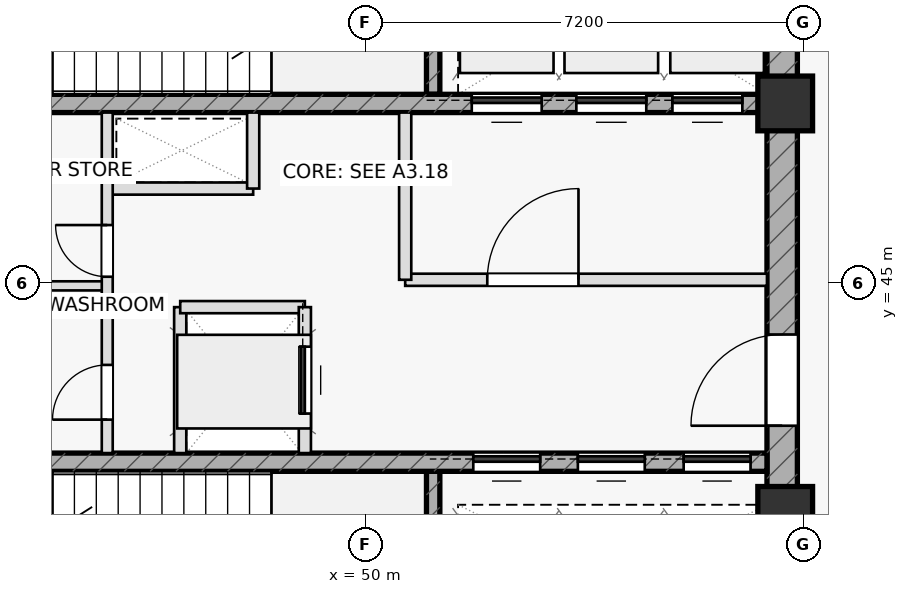
"""IFC4 building model, lengths in metres.
Left out: names, types, materials, properties, quantities, classifications, styles, units other than length and angle.
Written with IfcOpenShell. Run it as: python <this file> out.ifc"""

import sys

from ifc_helpers import new_model, si_unit, direction, frame, frame_2d, origin, origin_2d, place, context, subcontext, project, spatial, rectangle, extrude, element, fill, save


model = new_model("IFC4")
c1 = context("Model", 3, precision=1e-05, world=origin(), true_north=direction((0.0, 1.0)))
c2 = subcontext(c1, "Body", "Model", "MODEL_VIEW")
j1 = project(units=[si_unit("LENGTHUNIT", "METRE"), si_unit("PLANEANGLEUNIT", "RADIAN")], contexts=[c1])
p1 = place(None, origin())
s1 = spatial("IfcSite", under=j1, at=p1, CompositionType="ELEMENT")
p2 = place(p1, origin())
s2 = spatial("IfcBuilding", under=s1, at=p2, CompositionType="ELEMENT")
p3 = place(p2, frame((0.0, 0.0, 200.3)))
s3 = spatial("IfcBuildingStorey", under=s2, at=p3, CompositionType="ELEMENT", Elevation=200.3)
for number, where, z_axis, x_axis in (
    (1, (51.11, 48.1, 0.0), (0.0, 0.0, 1.0), (0.0, 1.0, 0.0)),
    (2, (51.11, 38.8, 0.0), (0.0, 0.0, 1.0), (0.0, 1.0, 0.0)),
):
    element("IfcWall", number, at=place(p3, frame(where, z_axis=z_axis, x_axis=x_axis)), inside=s3, PredefinedType="SHEAR", context=c2, shape_type="SweptSolid", body=[
        extrude(rectangle(XDim=3.1, YDim=0.22, at=frame_2d((1.55, 0.0))), origin(), (0.0, 0.0, 1.0), 3.55),
    ])
p4 = place(p3, frame((56.85, 38.8, 0.0), z_axis=(0.0, 0.0, 1.0), x_axis=(0.0, 1.0, 0.0)))
e3 = element("IfcWall", 3, at=p4, inside=s3, PredefinedType="SHEAR", context=c2, shape_type="SweptSolid", body=[
    extrude(rectangle(XDim=12.4, YDim=0.5, at=frame_2d((6.2, 0.0))), origin(), (0.0, 0.0, 1.0), 3.55),
])
p5 = place(p4, frame((3.85, 0.0, 0.0)))
e4 = element("IfcOpeningElement", 4, at=p5, cuts=e3, PredefinedType="OPENING", context=c2, shape_type="SweptSolid", body=[
    extrude(rectangle(XDim=1.5, YDim=2.2, at=frame_2d((0.75, 1.1))), frame((0.0, 0.26, 0.0), z_axis=(0.0, -1.0, 0.0), x_axis=(1.0, 0.0, 0.0)), (0.0, 0.0, 1.0), 0.52),
])
p6 = place(p3, frame((43.4, 47.95, 0.0), z_axis=(0.0, 0.0, 1.0), x_axis=(1.0, 0.0, 0.0)))
e5 = element("IfcWall", 5, at=p6, inside=s3, PredefinedType="SHEAR", context=c2, shape_type="SweptSolid", body=[
    extrude(rectangle(XDim=13.2, YDim=0.3, at=frame_2d((6.6, 0.0))), origin(), (0.0, 0.0, 1.0), 3.55),
])
p7 = place(p6, frame((8.345, 0.0, 0.0)))
e6 = element("IfcOpeningElement", 6, at=p7, cuts=e5, PredefinedType="OPENING", context=c2, shape_type="SweptSolid", body=[
    extrude(rectangle(XDim=1.15, YDim=2.2, at=frame_2d((0.575, 1.1))), frame((0.0, 0.16, 0.0), z_axis=(0.0, -1.0, 0.0), x_axis=(1.0, 0.0, 0.0)), (0.0, 0.0, 1.0), 0.32),
])
p8 = place(p6, frame((10.065, 0.0, 0.0)))
e7 = element("IfcOpeningElement", 7, at=p8, cuts=e5, PredefinedType="OPENING", context=c2, shape_type="SweptSolid", body=[
    extrude(rectangle(XDim=1.15, YDim=2.2, at=frame_2d((0.575, 1.1))), frame((0.0, 0.16, 0.0), z_axis=(0.0, -1.0, 0.0), x_axis=(1.0, 0.0, 0.0)), (0.0, 0.0, 1.0), 0.32),
])
p9 = place(p6, frame((11.645, 0.0, 0.0)))
e8 = element("IfcOpeningElement", 8, at=p9, cuts=e5, PredefinedType="OPENING", context=c2, shape_type="SweptSolid", body=[
    extrude(rectangle(XDim=1.15, YDim=2.2, at=frame_2d((0.575, 1.1))), frame((0.0, 0.16, 0.0), z_axis=(0.0, -1.0, 0.0), x_axis=(1.0, 0.0, 0.0)), (0.0, 0.0, 1.0), 0.32),
])
p10 = place(p3, frame((43.4, 42.05, 0.0), z_axis=(0.0, 0.0, 1.0), x_axis=(1.0, 0.0, 0.0)))
e9 = element("IfcWall", 9, at=p10, inside=s3, PredefinedType="SHEAR", context=c2, shape_type="SweptSolid", body=[
    extrude(rectangle(XDim=13.2, YDim=0.3, at=frame_2d((6.6, 0.0))), origin(), (0.0, 0.0, 1.0), 3.55),
])
p11 = place(p10, frame((8.37, 0.0, 0.0)))
e10 = element("IfcOpeningElement", 10, at=p11, cuts=e9, PredefinedType="OPENING", context=c2, shape_type="SweptSolid", body=[
    extrude(rectangle(XDim=1.1, YDim=2.15, at=frame_2d((0.55, 1.075))), frame((0.0, 0.16, 0.0), z_axis=(0.0, -1.0, 0.0), x_axis=(1.0, 0.0, 0.0)), (0.0, 0.0, 1.0), 0.32),
])
p12 = place(p10, frame((10.09, 0.0, 0.0)))
e11 = element("IfcOpeningElement", 11, at=p12, cuts=e9, PredefinedType="OPENING", context=c2, shape_type="SweptSolid", body=[
    extrude(rectangle(XDim=1.1, YDim=2.15, at=frame_2d((0.55, 1.075))), frame((0.0, 0.16, 0.0), z_axis=(0.0, -1.0, 0.0), x_axis=(1.0, 0.0, 0.0)), (0.0, 0.0, 1.0), 0.32),
])
p13 = place(p10, frame((11.83, 0.0, 0.0)))
e12 = element("IfcOpeningElement", 12, at=p13, cuts=e9, PredefinedType="OPENING", context=c2, shape_type="SweptSolid", body=[
    extrude(rectangle(XDim=1.1, YDim=2.15, at=frame_2d((0.55, 1.075))), frame((0.0, 0.16, 0.0), z_axis=(0.0, -1.0, 0.0), x_axis=(1.0, 0.0, 0.0)), (0.0, 0.0, 1.0), 0.32),
])
for number, where, z_axis, x_axis in (
    (13, (56.9, 47.95, 0.0), (0.0, 0.0, 1.0), (1.0, 0.0, 0.0)),
    (14, (56.9, 41.2, 0.0), (0.0, 0.0, 1.0), (1.0, 0.0, 0.0)),
):
    element("IfcColumn", number, at=place(p3, frame(where, z_axis=z_axis, x_axis=x_axis)), inside=s3, PredefinedType="COLUMN", context=c2, shape_type="SweptSolid", body=[
        extrude(rectangle(XDim=0.9, YDim=0.9, at=origin_2d()), origin(), (0.0, 0.0, 1.0), 3.55),
    ])
p14 = place(p3, frame((45.75, 46.55, 0.0), z_axis=(0.0, 0.0, 1.0), x_axis=(1.0, 0.0, 0.0)))
e15 = element("IfcWall", 15, at=p14, inside=s3, PredefinedType="PARTITIONING", context=c2, shape_type="SweptSolid", body=[
    extrude(rectangle(XDim=2.4, YDim=0.2, at=frame_2d((1.2, 0.0))), origin(), (0.0, 0.0, 1.0), 3.55),
])
p15 = place(p3, frame((48.15, 46.55, 0.0), z_axis=(0.0, 0.0, 1.0), x_axis=(0.0, 1.0, 0.0)))
e16 = element("IfcWall", 16, at=p15, inside=s3, PredefinedType="PARTITIONING", context=c2, shape_type="SweptSolid", body=[
    extrude(rectangle(XDim=1.25, YDim=0.2, at=frame_2d((0.625, 0.0))), origin(), (0.0, 0.0, 1.0), 3.55),
])
p16 = place(p3, frame((46.95, 42.2, 0.0), z_axis=(0.0, 0.0, 1.0), x_axis=(0.0, 1.0, 0.0)))
e17 = element("IfcWall", 17, at=p16, inside=s3, PredefinedType="PARTITIONING", context=c2, shape_type="SweptSolid", body=[
    extrude(rectangle(XDim=2.4, YDim=0.2, at=frame_2d((1.2, 0.0))), origin(), (0.0, 0.0, 1.0), 3.55),
])
p17 = place(p3, frame((46.95, 44.6, 0.0), z_axis=(0.0, 0.0, 1.0), x_axis=(1.0, 0.0, 0.0)))
e18 = element("IfcWall", 18, at=p17, inside=s3, PredefinedType="PARTITIONING", context=c2, shape_type="SweptSolid", body=[
    extrude(rectangle(XDim=2.05, YDim=0.2, at=frame_2d((1.025, 0.0))), origin(), (0.0, 0.0, 1.0), 3.55),
])
p18 = place(p3, frame((50.65, 45.05, 0.0), z_axis=(0.0, 0.0, 1.0), x_axis=(1.0, 0.0, 0.0)))
e19 = element("IfcWall", 19, at=p18, inside=s3, PredefinedType="PARTITIONING", context=c2, shape_type="SweptSolid", body=[
    extrude(rectangle(XDim=5.95, YDim=0.2, at=frame_2d((2.975, 0.0))), origin(), (0.0, 0.0, 1.0), 3.55),
])
p19 = place(p18, frame((1.35, 0.0, 0.0)))
e20 = element("IfcOpeningElement", 20, at=p19, cuts=e19, PredefinedType="OPENING", context=c2, shape_type="SweptSolid", body=[
    extrude(rectangle(XDim=1.5, YDim=2.2, at=frame_2d((0.75, 1.1))), frame((0.0, 0.11, 0.0), z_axis=(0.0, -1.0, 0.0), x_axis=(1.0, 0.0, 0.0)), (0.0, 0.0, 1.0), 0.22),
])
p20 = place(p3, frame((50.65, 45.05, 0.0), z_axis=(0.0, 0.0, 1.0), x_axis=(0.0, 1.0, 0.0)))
e21 = element("IfcWall", 21, at=p20, inside=s3, PredefinedType="PARTITIONING", context=c2, shape_type="SweptSolid", body=[
    extrude(rectangle(XDim=2.75, YDim=0.2, at=frame_2d((1.375, 0.0))), origin(), (0.0, 0.0, 1.0), 3.55),
])
p21 = place(p3, frame((43.4, 44.95, 0.0), z_axis=(0.0, 0.0, 1.0), x_axis=(1.0, 0.0, 0.0)))
e22 = element("IfcWall", 22, at=p21, inside=s3, PredefinedType="PARTITIONING", context=c2, shape_type="SweptSolid", body=[
    extrude(rectangle(XDim=2.35, YDim=0.15, at=frame_2d((1.175, 0.0))), origin(), (0.0, 0.0, 1.0), 3.55),
])
p22 = place(p3, frame((45.75, 42.2, 0.0), z_axis=(0.0, 0.0, 1.0), x_axis=(0.0, 1.0, 0.0)))
e23 = element("IfcWall", 23, at=p22, inside=s3, PredefinedType="PARTITIONING", context=c2, shape_type="SweptSolid", body=[
    extrude(rectangle(XDim=5.6, YDim=0.18, at=frame_2d((2.8, 0.0))), origin(), (0.0, 0.0, 1.0), 3.55),
])
p23 = place(p22, frame((0.55, 0.0, 0.0)))
e24 = element("IfcOpeningElement", 24, at=p23, cuts=e23, PredefinedType="OPENING", context=c2, shape_type="SweptSolid", body=[
    extrude(rectangle(XDim=0.9, YDim=2.05, at=frame_2d((0.45, 1.025))), frame((0.0, 0.1, 0.0), z_axis=(0.0, -1.0, 0.0), x_axis=(1.0, 0.0, 0.0)), (0.0, 0.0, 1.0), 0.2),
])
p24 = place(p22, frame((2.9, 0.0, 0.0)))
e25 = element("IfcOpeningElement", 25, at=p24, cuts=e23, PredefinedType="OPENING", context=c2, shape_type="SweptSolid", body=[
    extrude(rectangle(XDim=0.85, YDim=2.05, at=frame_2d((0.425, 1.025))), frame((0.0, 0.1, 0.0), z_axis=(0.0, -1.0, 0.0), x_axis=(1.0, 0.0, 0.0)), (0.0, 0.0, 1.0), 0.2),
])
p25 = place(p3, frame((49.0, 42.2, 0.0), z_axis=(0.0, 0.0, 1.0), x_axis=(0.0, 1.0, 0.0)))
e26 = element("IfcWall", 26, at=p25, inside=s3, PredefinedType="PARTITIONING", context=c2, shape_type="SweptSolid", body=[
    extrude(rectangle(XDim=2.4, YDim=0.2, at=frame_2d((1.2, 0.0))), origin(), (0.0, 0.0, 1.0), 3.55),
])
p26 = place(p25, frame((0.65, 0.0, 0.0)))
e27 = element("IfcOpeningElement", 27, at=p26, cuts=e26, PredefinedType="OPENING", context=c2, shape_type="SweptSolid", body=[
    extrude(rectangle(XDim=1.1, YDim=2.15, at=frame_2d((0.55, 1.075))), frame((0.0, 0.11, 0.0), z_axis=(0.0, -1.0, 0.0), x_axis=(1.0, 0.0, 0.0)), (0.0, 0.0, 1.0), 0.22),
])
p27 = place(p5, origin())
e28 = element("IfcDoor", 28, at=p27, inside=s3, OperationType="SINGLE_SWING_LEFT", PredefinedType="DOOR", context=c2, shape_type="SweptSolid", body=[
    extrude(rectangle(XDim=1.5, YDim=2.2, at=frame_2d((0.75, 1.1))), frame((0.0, 0.025, 0.0), z_axis=(0.0, -1.0, 0.0), x_axis=(1.0, 0.0, 0.0)), (0.0, 0.0, 1.0), 0.05),
])
fill(e4, e28)
p28 = place(p19, origin())
e29 = element("IfcDoor", 29, at=p28, inside=s3, OperationType="SINGLE_SWING_RIGHT", PredefinedType="DOOR", context=c2, shape_type="SweptSolid", body=[
    extrude(rectangle(XDim=1.5, YDim=2.2, at=frame_2d((0.75, 1.1))), frame((0.0, 0.025, 0.0), z_axis=(0.0, -1.0, 0.0), x_axis=(1.0, 0.0, 0.0)), (0.0, 0.0, 1.0), 0.05),
])
fill(e20, e29)
p29 = place(p23, origin())
e30 = element("IfcDoor", 30, at=p29, inside=s3, OperationType="SINGLE_SWING_LEFT", PredefinedType="DOOR", context=c2, shape_type="SweptSolid", body=[
    extrude(rectangle(XDim=0.9, YDim=2.05, at=frame_2d((0.45, 1.025))), frame((0.0, 0.025, 0.0), z_axis=(0.0, -1.0, 0.0), x_axis=(1.0, 0.0, 0.0)), (0.0, 0.0, 1.0), 0.05),
])
fill(e24, e30)
p30 = place(p24, origin())
e31 = element("IfcDoor", 31, at=p30, inside=s3, OperationType="SINGLE_SWING_RIGHT", PredefinedType="DOOR", context=c2, shape_type="SweptSolid", body=[
    extrude(rectangle(XDim=0.85, YDim=2.05, at=frame_2d((0.425, 1.025))), frame((0.0, 0.025, 0.0), z_axis=(0.0, -1.0, 0.0), x_axis=(1.0, 0.0, 0.0)), (0.0, 0.0, 1.0), 0.05),
])
fill(e25, e31)
p31 = place(p7, origin())
e32 = element("IfcDoor", 32, at=p31, inside=s3, OperationType="SLIDING_TO_LEFT", PredefinedType="DOOR", context=c2, shape_type="SweptSolid", body=[
    extrude(rectangle(XDim=1.15, YDim=2.2, at=frame_2d((0.575, 1.1))), frame((0.0, 0.025, 0.0), z_axis=(0.0, -1.0, 0.0), x_axis=(1.0, 0.0, 0.0)), (0.0, 0.0, 1.0), 0.05),
])
fill(e6, e32)
p32 = place(p8, origin())
e33 = element("IfcDoor", 33, at=p32, inside=s3, OperationType="SLIDING_TO_LEFT", PredefinedType="DOOR", context=c2, shape_type="SweptSolid", body=[
    extrude(rectangle(XDim=1.15, YDim=2.2, at=frame_2d((0.575, 1.1))), frame((0.0, 0.025, 0.0), z_axis=(0.0, -1.0, 0.0), x_axis=(1.0, 0.0, 0.0)), (0.0, 0.0, 1.0), 0.05),
])
fill(e7, e33)
p33 = place(p9, origin())
e34 = element("IfcDoor", 34, at=p33, inside=s3, OperationType="SLIDING_TO_LEFT", PredefinedType="DOOR", context=c2, shape_type="SweptSolid", body=[
    extrude(rectangle(XDim=1.15, YDim=2.2, at=frame_2d((0.575, 1.1))), frame((0.0, 0.025, 0.0), z_axis=(0.0, -1.0, 0.0), x_axis=(1.0, 0.0, 0.0)), (0.0, 0.0, 1.0), 0.05),
])
fill(e8, e34)
p34 = place(p11, origin())
e35 = element("IfcDoor", 35, at=p34, inside=s3, OperationType="SLIDING_TO_LEFT", PredefinedType="DOOR", context=c2, shape_type="SweptSolid", body=[
    extrude(rectangle(XDim=1.1, YDim=2.15, at=frame_2d((0.55, 1.075))), frame((0.0, 0.025, 0.0), z_axis=(0.0, -1.0, 0.0), x_axis=(1.0, 0.0, 0.0)), (0.0, 0.0, 1.0), 0.05),
])
fill(e10, e35)
p35 = place(p12, origin())
e36 = element("IfcDoor", 36, at=p35, inside=s3, OperationType="SLIDING_TO_LEFT", PredefinedType="DOOR", context=c2, shape_type="SweptSolid", body=[
    extrude(rectangle(XDim=1.1, YDim=2.15, at=frame_2d((0.55, 1.075))), frame((0.0, 0.025, 0.0), z_axis=(0.0, -1.0, 0.0), x_axis=(1.0, 0.0, 0.0)), (0.0, 0.0, 1.0), 0.05),
])
fill(e11, e36)
p36 = place(p13, origin())
e37 = element("IfcDoor", 37, at=p36, inside=s3, OperationType="SLIDING_TO_LEFT", PredefinedType="DOOR", context=c2, shape_type="SweptSolid", body=[
    extrude(rectangle(XDim=1.1, YDim=2.15, at=frame_2d((0.55, 1.075))), frame((0.0, 0.025, 0.0), z_axis=(0.0, -1.0, 0.0), x_axis=(1.0, 0.0, 0.0)), (0.0, 0.0, 1.0), 0.05),
])
fill(e12, e37)
p37 = place(p26, origin())
e38 = element("IfcDoor", 38, at=p37, inside=s3, OperationType="SLIDING_TO_RIGHT", PredefinedType="DOOR", context=c2, shape_type="SweptSolid", body=[
    extrude(rectangle(XDim=1.1, YDim=2.15, at=frame_2d((0.55, 1.075))), frame((0.0, 0.025, 0.0), z_axis=(0.0, -1.0, 0.0), x_axis=(1.0, 0.0, 0.0)), (0.0, 0.0, 1.0), 0.05),
])
fill(e27, e38)
save(model, sys.argv[1])
